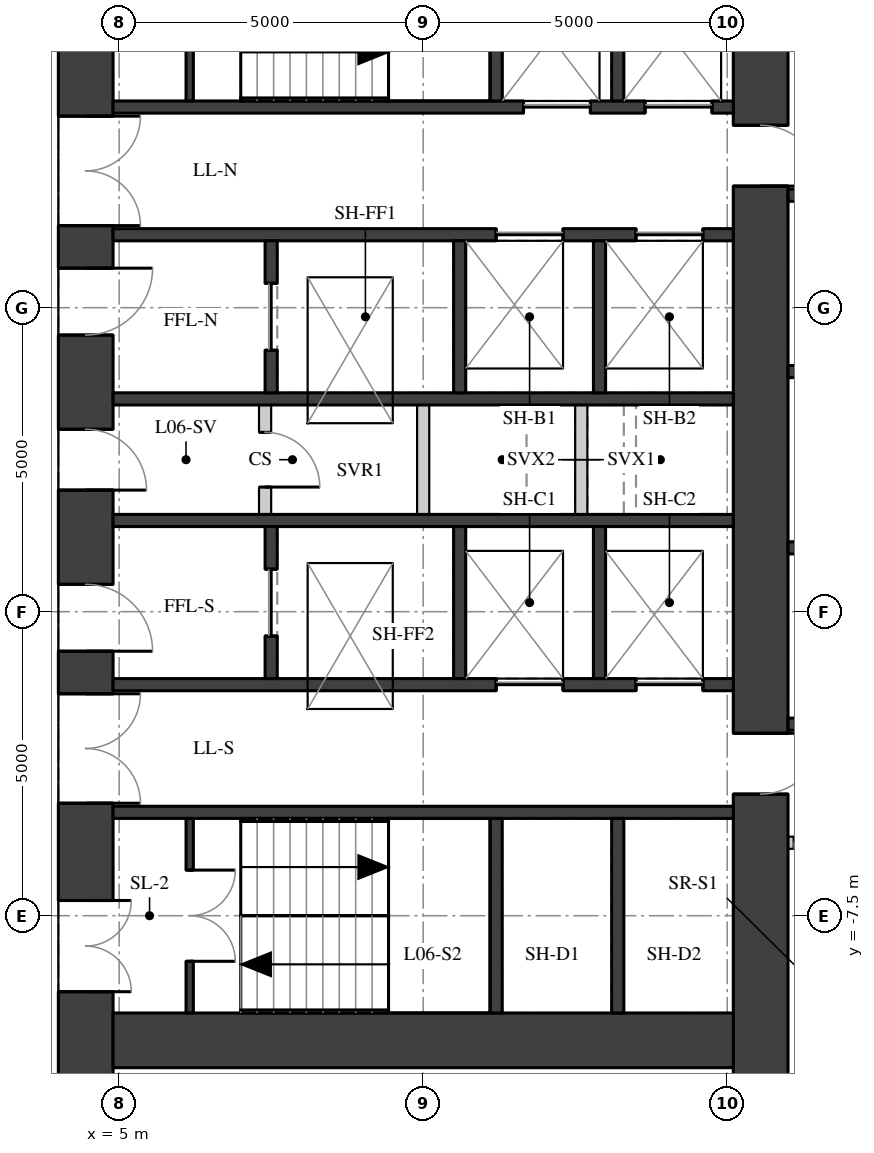
"""IFC4 building model, lengths in metres.
Left out: names, types, materials, properties, quantities, classifications, styles, units other than length and angle.
Written with IfcOpenShell. Run it as: python <this file> out.ifc"""

import sys

from ifc_helpers import new_model, si_unit, direction, frame, frame_2d, origin, place, context, subcontext, project, spatial, rectangle, extrude, element, fill, save


model = new_model("IFC4")
c1 = context("Model", 3, precision=1e-05, world=origin(), true_north=direction((0.0, 1.0)))
c2 = subcontext(c1, "Body", "Model", "MODEL_VIEW")
j1 = project(units=[si_unit("LENGTHUNIT", "METRE"), si_unit("PLANEANGLEUNIT", "RADIAN")], contexts=[c1])
p1 = place(None, origin())
s1 = spatial("IfcSite", under=j1, at=p1, CompositionType="ELEMENT")
p2 = place(p1, origin())
s2 = spatial("IfcBuilding", under=s1, at=p2, CompositionType="ELEMENT")
p3 = place(p2, frame((0.0, 0.0, 28.3)))
s3 = spatial("IfcBuildingStorey", under=s2, at=p3, CompositionType="ELEMENT", Elevation=28.3)
p4 = place(p3, frame((4.45, -11.1, 0.0), z_axis=(0.0, 0.0, 1.0), x_axis=(0.0, 1.0, 0.0)))
e1 = element("IfcWall", 1, at=p4, inside=s3, PredefinedType="SHEAR", context=c2, shape_type="SweptSolid", body=[
    extrude(rectangle(XDim=22.2, YDim=0.9, at=frame_2d((11.1, 0.0))), origin(), (0.0, 0.0, 1.0), 3.02),
])
p5 = place(p4, frame((2.35, 0.0, 0.0)))
e2 = element("IfcOpeningElement", 2, at=p5, cuts=e1, PredefinedType="OPENING", context=c2, shape_type="SweptSolid", body=[
    extrude(rectangle(XDim=1.5, YDim=2.1, at=frame_2d((0.75, 1.05))), frame((0.0, 0.46, 0.0), z_axis=(0.0, -1.0, 0.0), x_axis=(1.0, 0.0, 0.0)), (0.0, 0.0, 1.0), 0.92),
])
p6 = place(p4, frame((5.45, 0.0, 0.0)))
e3 = element("IfcOpeningElement", 3, at=p6, cuts=e1, PredefinedType="OPENING", context=c2, shape_type="SweptSolid", body=[
    extrude(rectangle(XDim=1.8, YDim=2.1, at=frame_2d((0.9, 1.05))), frame((0.0, 0.46, 0.0), z_axis=(0.0, -1.0, 0.0), x_axis=(1.0, 0.0, 0.0)), (0.0, 0.0, 1.0), 0.92),
])
p7 = place(p4, frame((7.95, 0.0, 0.0)))
e4 = element("IfcOpeningElement", 4, at=p7, cuts=e1, PredefinedType="OPENING", context=c2, shape_type="SweptSolid", body=[
    extrude(rectangle(XDim=1.1, YDim=2.1, at=frame_2d((0.55, 1.05))), frame((0.0, 0.46, 0.0), z_axis=(0.0, -1.0, 0.0), x_axis=(1.0, 0.0, 0.0)), (0.0, 0.0, 1.0), 0.92),
])
p8 = place(p4, frame((10.6, 0.0, 0.0)))
e5 = element("IfcOpeningElement", 5, at=p8, cuts=e1, PredefinedType="OPENING", context=c2, shape_type="SweptSolid", body=[
    extrude(rectangle(XDim=1.0, YDim=2.1, at=frame_2d((0.5, 1.05))), frame((0.0, 0.46, 0.0), z_axis=(0.0, -1.0, 0.0), x_axis=(1.0, 0.0, 0.0)), (0.0, 0.0, 1.0), 0.92),
])
p9 = place(p4, frame((13.15, 0.0, 0.0)))
e6 = element("IfcOpeningElement", 6, at=p9, cuts=e1, PredefinedType="OPENING", context=c2, shape_type="SweptSolid", body=[
    extrude(rectangle(XDim=1.1, YDim=2.1, at=frame_2d((0.55, 1.05))), frame((0.0, 0.46, 0.0), z_axis=(0.0, -1.0, 0.0), x_axis=(1.0, 0.0, 0.0)), (0.0, 0.0, 1.0), 0.92),
])
p10 = place(p4, frame((14.95, 0.0, 0.0)))
e7 = element("IfcOpeningElement", 7, at=p10, cuts=e1, PredefinedType="OPENING", context=c2, shape_type="SweptSolid", body=[
    extrude(rectangle(XDim=1.8, YDim=2.1, at=frame_2d((0.9, 1.05))), frame((0.0, 0.46, 0.0), z_axis=(0.0, -1.0, 0.0), x_axis=(1.0, 0.0, 0.0)), (0.0, 0.0, 1.0), 0.92),
])
p11 = place(p4, frame((18.35, 0.0, 0.0)))
e8 = element("IfcOpeningElement", 8, at=p11, cuts=e1, PredefinedType="OPENING", context=c2, shape_type="SweptSolid", body=[
    extrude(rectangle(XDim=1.5, YDim=2.1, at=frame_2d((0.75, 1.05))), frame((0.0, 0.46, 0.0), z_axis=(0.0, -1.0, 0.0), x_axis=(1.0, 0.0, 0.0)), (0.0, 0.0, 1.0), 0.92),
])
p12 = place(p3, frame((15.55, -11.1, 0.0), z_axis=(0.0, 0.0, 1.0), x_axis=(0.0, 1.0, 0.0)))
e9 = element("IfcWall", 9, at=p12, inside=s3, PredefinedType="SHEAR", context=c2, shape_type="SweptSolid", body=[
    extrude(rectangle(XDim=22.2, YDim=0.9, at=frame_2d((11.1, 0.0))), origin(), (0.0, 0.0, 1.0), 3.02),
])
p13 = place(p12, frame((15.6, 0.0, 0.0)))
e10 = element("IfcOpeningElement", 10, at=p13, cuts=e9, PredefinedType="OPENING", context=c2, shape_type="SweptSolid", body=[
    extrude(rectangle(XDim=1.0, YDim=2.1, at=frame_2d((0.5, 1.05))), frame((0.0, 0.46, 0.0), z_axis=(0.0, -1.0, 0.0), x_axis=(1.0, 0.0, 0.0)), (0.0, 0.0, 1.0), 0.92),
])
p14 = place(p12, frame((5.6, 0.0, 0.0)))
e11 = element("IfcOpeningElement", 11, at=p14, cuts=e9, PredefinedType="OPENING", context=c2, shape_type="SweptSolid", body=[
    extrude(rectangle(XDim=1.0, YDim=2.1, at=frame_2d((0.5, 1.05))), frame((0.0, 0.46, 0.0), z_axis=(0.0, -1.0, 0.0), x_axis=(1.0, 0.0, 0.0)), (0.0, 0.0, 1.0), 0.92),
])
p15 = place(p3, frame((4.9, -9.55, 0.0), z_axis=(0.0, 0.0, 1.0), x_axis=(1.0, 0.0, 0.0)))
e12 = element("IfcWall", 12, at=p15, inside=s3, PredefinedType="SHEAR", context=c2, shape_type="SweptSolid", body=[
    extrude(rectangle(XDim=10.2, YDim=0.9, at=frame_2d((5.1, 0.0))), origin(), (0.0, 0.0, 1.0), 3.02),
])
p16 = place(p3, frame((4.9, 5.8, 0.0), z_axis=(0.0, 0.0, 1.0), x_axis=(1.0, 0.0, 0.0)))
e13 = element("IfcWall", 13, at=p16, inside=s3, PredefinedType="SHEAR", context=c2, shape_type="SweptSolid", body=[
    extrude(rectangle(XDim=10.2, YDim=0.2, at=frame_2d((5.1, 0.0))), origin(), (0.0, 0.0, 1.0), 3.02),
])
p17 = place(p16, frame((6.75, 0.0, 0.0)))
e14 = element("IfcOpeningElement", 14, at=p17, cuts=e13, PredefinedType="OPENING", context=c2, shape_type="SweptSolid", body=[
    extrude(rectangle(XDim=1.1, YDim=2.1, at=frame_2d((0.55, 1.05))), frame((0.0, 0.11, 0.0), z_axis=(0.0, -1.0, 0.0), x_axis=(1.0, 0.0, 0.0)), (0.0, 0.0, 1.0), 0.22),
])
p18 = place(p16, frame((8.75, 0.0, 0.0)))
e15 = element("IfcOpeningElement", 15, at=p18, cuts=e13, PredefinedType="OPENING", context=c2, shape_type="SweptSolid", body=[
    extrude(rectangle(XDim=1.1, YDim=2.1, at=frame_2d((0.55, 1.05))), frame((0.0, 0.11, 0.0), z_axis=(0.0, -1.0, 0.0), x_axis=(1.0, 0.0, 0.0)), (0.0, 0.0, 1.0), 0.22),
])
p19 = place(p3, frame((4.9, 3.7, 0.0), z_axis=(0.0, 0.0, 1.0), x_axis=(1.0, 0.0, 0.0)))
e16 = element("IfcWall", 16, at=p19, inside=s3, PredefinedType="SHEAR", context=c2, shape_type="SweptSolid", body=[
    extrude(rectangle(XDim=10.2, YDim=0.2, at=frame_2d((5.1, 0.0))), origin(), (0.0, 0.0, 1.0), 3.02),
])
p20 = place(p19, frame((6.3, 0.0, 0.0)))
e17 = element("IfcOpeningElement", 17, at=p20, cuts=e16, PredefinedType="OPENING", context=c2, shape_type="SweptSolid", body=[
    extrude(rectangle(XDim=1.1, YDim=2.1, at=frame_2d((0.55, 1.05))), frame((0.0, 0.11, 0.0), z_axis=(0.0, -1.0, 0.0), x_axis=(1.0, 0.0, 0.0)), (0.0, 0.0, 1.0), 0.22),
])
p21 = place(p19, frame((8.6, 0.0, 0.0)))
e18 = element("IfcOpeningElement", 18, at=p21, cuts=e16, PredefinedType="OPENING", context=c2, shape_type="SweptSolid", body=[
    extrude(rectangle(XDim=1.1, YDim=2.1, at=frame_2d((0.55, 1.05))), frame((0.0, 0.11, 0.0), z_axis=(0.0, -1.0, 0.0), x_axis=(1.0, 0.0, 0.0)), (0.0, 0.0, 1.0), 0.22),
])
for number, where, z_axis, x_axis in (
    (19, (4.9, 1.0, 0.0), (0.0, 0.0, 1.0), (1.0, 0.0, 0.0)),
    (20, (4.9, -1.0, 0.0), (0.0, 0.0, 1.0), (1.0, 0.0, 0.0)),
):
    element("IfcWall", number, at=place(p3, frame(where, z_axis=z_axis, x_axis=x_axis)), inside=s3, PredefinedType="SHEAR", context=c2, shape_type="SweptSolid", body=[
        extrude(rectangle(XDim=10.2, YDim=0.2, at=frame_2d((5.1, 0.0))), origin(), (0.0, 0.0, 1.0), 3.02),
    ])
p22 = place(p3, frame((4.9, -3.7, 0.0), z_axis=(0.0, 0.0, 1.0), x_axis=(1.0, 0.0, 0.0)))
e21 = element("IfcWall", 21, at=p22, inside=s3, PredefinedType="SHEAR", context=c2, shape_type="SweptSolid", body=[
    extrude(rectangle(XDim=10.2, YDim=0.2, at=frame_2d((5.1, 0.0))), origin(), (0.0, 0.0, 1.0), 3.02),
])
p23 = place(p22, frame((6.3, 0.0, 0.0)))
e22 = element("IfcOpeningElement", 22, at=p23, cuts=e21, PredefinedType="OPENING", context=c2, shape_type="SweptSolid", body=[
    extrude(rectangle(XDim=1.1, YDim=2.1, at=frame_2d((0.55, 1.05))), frame((0.0, 0.11, 0.0), z_axis=(0.0, -1.0, 0.0), x_axis=(1.0, 0.0, 0.0)), (0.0, 0.0, 1.0), 0.22),
])
p24 = place(p22, frame((8.6, 0.0, 0.0)))
e23 = element("IfcOpeningElement", 23, at=p24, cuts=e21, PredefinedType="OPENING", context=c2, shape_type="SweptSolid", body=[
    extrude(rectangle(XDim=1.1, YDim=2.1, at=frame_2d((0.55, 1.05))), frame((0.0, 0.11, 0.0), z_axis=(0.0, -1.0, 0.0), x_axis=(1.0, 0.0, 0.0)), (0.0, 0.0, 1.0), 0.22),
])
p25 = place(p3, frame((4.9, -5.8, 0.0), z_axis=(0.0, 0.0, 1.0), x_axis=(1.0, 0.0, 0.0)))
e24 = element("IfcWall", 24, at=p25, inside=s3, PredefinedType="SHEAR", context=c2, shape_type="SweptSolid", body=[
    extrude(rectangle(XDim=10.2, YDim=0.2, at=frame_2d((5.1, 0.0))), origin(), (0.0, 0.0, 1.0), 3.02),
])
for number, where, z_axis, x_axis in (
    (25, (11.2, 5.9, 0.0), (0.0, 0.0, 1.0), (0.0, 1.0, 0.0)),
    (26, (11.2, -9.1, 0.0), (0.0, 0.0, 1.0), (0.0, 1.0, 0.0)),
    (27, (13.2, 5.9, 0.0), (0.0, 0.0, 1.0), (0.0, 1.0, 0.0)),
    (28, (13.2, -9.1, 0.0), (0.0, 0.0, 1.0), (0.0, 1.0, 0.0)),
):
    element("IfcWall", number, at=place(p3, frame(where, z_axis=z_axis, x_axis=x_axis)), inside=s3, PredefinedType="SHEAR", context=c2, shape_type="SweptSolid", body=[
        extrude(rectangle(XDim=3.2, YDim=0.2, at=frame_2d((1.6, 0.0))), origin(), (0.0, 0.0, 1.0), 3.02),
    ])
p26 = place(p3, frame((7.5, 1.1, 0.0), z_axis=(0.0, 0.0, 1.0), x_axis=(0.0, 1.0, 0.0)))
e29 = element("IfcWall", 29, at=p26, inside=s3, PredefinedType="SHEAR", context=c2, shape_type="SweptSolid", body=[
    extrude(rectangle(XDim=2.5, YDim=0.2, at=frame_2d((1.25, 0.0))), origin(), (0.0, 0.0, 1.0), 3.02),
])
p27 = place(p26, frame((0.7, 0.0, 0.0)))
e30 = element("IfcOpeningElement", 30, at=p27, cuts=e29, PredefinedType="OPENING", context=c2, shape_type="SweptSolid", body=[
    extrude(rectangle(XDim=1.1, YDim=2.1, at=frame_2d((0.55, 1.05))), frame((0.0, 0.11, 0.0), z_axis=(0.0, -1.0, 0.0), x_axis=(1.0, 0.0, 0.0)), (0.0, 0.0, 1.0), 0.22),
])
p28 = place(p3, frame((7.5, -3.6, 0.0), z_axis=(0.0, 0.0, 1.0), x_axis=(0.0, 1.0, 0.0)))
e31 = element("IfcWall", 31, at=p28, inside=s3, PredefinedType="SHEAR", context=c2, shape_type="SweptSolid", body=[
    extrude(rectangle(XDim=2.5, YDim=0.2, at=frame_2d((1.25, 0.0))), origin(), (0.0, 0.0, 1.0), 3.02),
])
p29 = place(p28, frame((0.7, 0.0, 0.0)))
e32 = element("IfcOpeningElement", 32, at=p29, cuts=e31, PredefinedType="OPENING", context=c2, shape_type="SweptSolid", body=[
    extrude(rectangle(XDim=1.1, YDim=2.1, at=frame_2d((0.55, 1.05))), frame((0.0, 0.11, 0.0), z_axis=(0.0, -1.0, 0.0), x_axis=(1.0, 0.0, 0.0)), (0.0, 0.0, 1.0), 0.22),
])
for number, where, z_axis, x_axis in (
    (33, (10.6, 1.1, 0.0), (0.0, 0.0, 1.0), (0.0, 1.0, 0.0)),
    (34, (10.6, -3.6, 0.0), (0.0, 0.0, 1.0), (0.0, 1.0, 0.0)),
    (35, (12.9, 1.1, 0.0), (0.0, 0.0, 1.0), (0.0, 1.0, 0.0)),
    (36, (12.9, -3.6, 0.0), (0.0, 0.0, 1.0), (0.0, 1.0, 0.0)),
):
    element("IfcWall", number, at=place(p3, frame(where, z_axis=z_axis, x_axis=x_axis)), inside=s3, PredefinedType="SHEAR", context=c2, shape_type="SweptSolid", body=[
        extrude(rectangle(XDim=2.5, YDim=0.2, at=frame_2d((1.25, 0.0))), origin(), (0.0, 0.0, 1.0), 3.02),
    ])
p30 = place(p3, frame((6.16, 5.9, 0.0), z_axis=(0.0, 0.0, 1.0), x_axis=(0.0, 1.0, 0.0)))
e37 = element("IfcWall", 37, at=p30, inside=s3, PredefinedType="SHEAR", context=c2, shape_type="SweptSolid", body=[
    extrude(rectangle(XDim=3.2, YDim=0.12, at=frame_2d((1.6, 0.0))), origin(), (0.0, 0.0, 1.0), 3.02),
])
p31 = place(p30, frame((0.85, 0.0, 0.0)))
e38 = element("IfcOpeningElement", 38, at=p31, cuts=e37, PredefinedType="OPENING", context=c2, shape_type="SweptSolid", body=[
    extrude(rectangle(XDim=1.5, YDim=2.1, at=frame_2d((0.75, 1.05))), frame((0.0, 0.07, 0.0), z_axis=(0.0, -1.0, 0.0), x_axis=(1.0, 0.0, 0.0)), (0.0, 0.0, 1.0), 0.14),
])
p32 = place(p3, frame((6.16, -9.1, 0.0), z_axis=(0.0, 0.0, 1.0), x_axis=(0.0, 1.0, 0.0)))
e39 = element("IfcWall", 39, at=p32, inside=s3, PredefinedType="SHEAR", context=c2, shape_type="SweptSolid", body=[
    extrude(rectangle(XDim=3.2, YDim=0.12, at=frame_2d((1.6, 0.0))), origin(), (0.0, 0.0, 1.0), 3.02),
])
p33 = place(p32, frame((0.85, 0.0, 0.0)))
e40 = element("IfcOpeningElement", 40, at=p33, cuts=e39, PredefinedType="OPENING", context=c2, shape_type="SweptSolid", body=[
    extrude(rectangle(XDim=1.5, YDim=2.1, at=frame_2d((0.75, 1.05))), frame((0.0, 0.07, 0.0), z_axis=(0.0, -1.0, 0.0), x_axis=(1.0, 0.0, 0.0)), (0.0, 0.0, 1.0), 0.14),
])
p34 = place(p3, frame((7.4, -0.9, 0.0), z_axis=(0.0, 0.0, 1.0), x_axis=(0.0, 1.0, 0.0)))
e41 = element("IfcWall", 41, at=p34, inside=s3, PredefinedType="PARTITIONING", context=c2, shape_type="SweptSolid", body=[
    extrude(rectangle(XDim=1.8, YDim=0.2, at=frame_2d((0.9, 0.0))), origin(), (0.0, 0.0, 1.0), 3.02),
])
p35 = place(p34, frame((0.45, 0.0, 0.0)))
e42 = element("IfcOpeningElement", 42, at=p35, cuts=e41, PredefinedType="OPENING", context=c2, shape_type="SweptSolid", body=[
    extrude(rectangle(XDim=0.9, YDim=2.1, at=frame_2d((0.45, 1.05))), frame((0.0, 0.11, 0.0), z_axis=(0.0, -1.0, 0.0), x_axis=(1.0, 0.0, 0.0)), (0.0, 0.0, 1.0), 0.22),
])
for number, where, z_axis, x_axis in (
    (43, (10.0, -0.9, 0.0), (0.0, 0.0, 1.0), (0.0, 1.0, 0.0)),
    (44, (12.6, -0.9, 0.0), (0.0, 0.0, 1.0), (0.0, 1.0, 0.0)),
):
    element("IfcWall", number, at=place(p3, frame(where, z_axis=z_axis, x_axis=x_axis)), inside=s3, PredefinedType="PARTITIONING", context=c2, shape_type="SweptSolid", body=[
        extrude(rectangle(XDim=1.8, YDim=0.2, at=frame_2d((0.9, 0.0))), origin(), (0.0, 0.0, 1.0), 3.02),
    ])
for number, where, z_axis, x_axis in (
    (45, (16.0, -4.35, 0.0), (0.0, 0.0, 1.0), (1.0, 0.0, 0.0)),
    (46, (16.0, -1.45, 0.0), (0.0, 0.0, 1.0), (1.0, 0.0, 0.0)),
    (47, (16.0, 1.45, 0.0), (0.0, 0.0, 1.0), (1.0, 0.0, 0.0)),
    (48, (16.0, 4.35, 0.0), (0.0, 0.0, 1.0), (1.0, 0.0, 0.0)),
):
    element("IfcWall", number, at=place(p3, frame(where, z_axis=z_axis, x_axis=x_axis)), inside=s3, PredefinedType="SHEAR", context=c2, shape_type="SweptSolid", body=[
        extrude(rectangle(XDim=2.3, YDim=0.2, at=frame_2d((1.15, 0.0))), origin(), (0.0, 0.0, 1.0), 3.02),
    ])
p36 = place(p3, frame((16.0, -6.3, 0.0), z_axis=(0.0, 0.0, 1.0), x_axis=(1.0, 0.0, 0.0)))
e49 = element("IfcWall", 49, at=p36, inside=s3, PredefinedType="PARTITIONING", context=c2, shape_type="SweptSolid", body=[
    extrude(rectangle(XDim=2.3, YDim=0.2, at=frame_2d((1.15, 0.0))), origin(), (0.0, 0.0, 1.0), 3.02),
])
p37 = place(p36, frame((0.1, 0.0, 0.0)))
e50 = element("IfcOpeningElement", 50, at=p37, cuts=e49, PredefinedType="OPENING", context=c2, shape_type="SweptSolid", body=[
    extrude(rectangle(XDim=0.9, YDim=2.1, at=frame_2d((0.45, 1.05))), frame((0.0, 0.11, 0.0), z_axis=(0.0, -1.0, 0.0), x_axis=(1.0, 0.0, 0.0)), (0.0, 0.0, 1.0), 0.22),
])
p38 = place(p5, origin())
e51 = element("IfcDoor", 51, at=p38, inside=s3, OperationType="DOUBLE_DOOR_SINGLE_SWING", PredefinedType="DOOR", context=c2, shape_type="SweptSolid", body=[
    extrude(rectangle(XDim=1.5, YDim=2.1, at=frame_2d((0.75, 1.05))), frame((0.0, 0.025, 0.0), z_axis=(0.0, -1.0, 0.0), x_axis=(1.0, 0.0, 0.0)), (0.0, 0.0, 1.0), 0.05),
])
fill(e2, e51)
p39 = place(p6, origin())
e52 = element("IfcDoor", 52, at=p39, inside=s3, OperationType="DOUBLE_DOOR_SINGLE_SWING", PredefinedType="DOOR", context=c2, shape_type="SweptSolid", body=[
    extrude(rectangle(XDim=1.8, YDim=2.1, at=frame_2d((0.9, 1.05))), frame((0.0, 0.025, 0.0), z_axis=(0.0, -1.0, 0.0), x_axis=(1.0, 0.0, 0.0)), (0.0, 0.0, 1.0), 0.05),
])
fill(e3, e52)
p40 = place(p7, origin())
e53 = element("IfcDoor", 53, at=p40, inside=s3, OperationType="SINGLE_SWING_RIGHT", PredefinedType="DOOR", context=c2, shape_type="SweptSolid", body=[
    extrude(rectangle(XDim=1.1, YDim=2.1, at=frame_2d((0.55, 1.05))), frame((0.0, 0.025, 0.0), z_axis=(0.0, -1.0, 0.0), x_axis=(1.0, 0.0, 0.0)), (0.0, 0.0, 1.0), 0.05),
])
fill(e4, e53)
p41 = place(p8, origin())
e54 = element("IfcDoor", 54, at=p41, inside=s3, OperationType="SINGLE_SWING_RIGHT", PredefinedType="DOOR", context=c2, shape_type="SweptSolid", body=[
    extrude(rectangle(XDim=1.0, YDim=2.1, at=frame_2d((0.5, 1.05))), frame((0.0, 0.025, 0.0), z_axis=(0.0, -1.0, 0.0), x_axis=(1.0, 0.0, 0.0)), (0.0, 0.0, 1.0), 0.05),
])
fill(e5, e54)
p42 = place(p9, origin())
e55 = element("IfcDoor", 55, at=p42, inside=s3, OperationType="SINGLE_SWING_LEFT", PredefinedType="DOOR", context=c2, shape_type="SweptSolid", body=[
    extrude(rectangle(XDim=1.1, YDim=2.1, at=frame_2d((0.55, 1.05))), frame((0.0, 0.025, 0.0), z_axis=(0.0, -1.0, 0.0), x_axis=(1.0, 0.0, 0.0)), (0.0, 0.0, 1.0), 0.05),
])
fill(e6, e55)
p43 = place(p10, origin())
e56 = element("IfcDoor", 56, at=p43, inside=s3, OperationType="DOUBLE_DOOR_SINGLE_SWING", PredefinedType="DOOR", context=c2, shape_type="SweptSolid", body=[
    extrude(rectangle(XDim=1.8, YDim=2.1, at=frame_2d((0.9, 1.05))), frame((0.0, 0.025, 0.0), z_axis=(0.0, -1.0, 0.0), x_axis=(1.0, 0.0, 0.0)), (0.0, 0.0, 1.0), 0.05),
])
fill(e7, e56)
p44 = place(p33, origin())
e57 = element("IfcDoor", 57, at=p44, inside=s3, OperationType="DOUBLE_DOOR_SINGLE_SWING", PredefinedType="DOOR", context=c2, shape_type="SweptSolid", body=[
    extrude(rectangle(XDim=1.5, YDim=2.1, at=frame_2d((0.75, 1.05))), frame((0.0, 0.025, 0.0), z_axis=(0.0, -1.0, 0.0), x_axis=(1.0, 0.0, 0.0)), (0.0, 0.0, 1.0), 0.05),
])
fill(e40, e57)
p45 = place(p17, origin())
e58 = element("IfcDoor", 58, at=p45, inside=s3, OperationType="DOUBLE_DOOR_SLIDING", PredefinedType="DOOR", context=c2, shape_type="SweptSolid", body=[
    extrude(rectangle(XDim=1.1, YDim=2.1, at=frame_2d((0.55, 1.05))), frame((0.0, 0.025, 0.0), z_axis=(0.0, -1.0, 0.0), x_axis=(1.0, 0.0, 0.0)), (0.0, 0.0, 1.0), 0.05),
])
fill(e14, e58)
p46 = place(p18, origin())
e59 = element("IfcDoor", 59, at=p46, inside=s3, OperationType="DOUBLE_DOOR_SLIDING", PredefinedType="DOOR", context=c2, shape_type="SweptSolid", body=[
    extrude(rectangle(XDim=1.1, YDim=2.1, at=frame_2d((0.55, 1.05))), frame((0.0, 0.025, 0.0), z_axis=(0.0, -1.0, 0.0), x_axis=(1.0, 0.0, 0.0)), (0.0, 0.0, 1.0), 0.05),
])
fill(e15, e59)
p47 = place(p20, origin())
e60 = element("IfcDoor", 60, at=p47, inside=s3, OperationType="DOUBLE_DOOR_SLIDING", PredefinedType="DOOR", context=c2, shape_type="SweptSolid", body=[
    extrude(rectangle(XDim=1.1, YDim=2.1, at=frame_2d((0.55, 1.05))), frame((0.0, 0.025, 0.0), z_axis=(0.0, -1.0, 0.0), x_axis=(1.0, 0.0, 0.0)), (0.0, 0.0, 1.0), 0.05),
])
fill(e17, e60)
p48 = place(p21, origin())
e61 = element("IfcDoor", 61, at=p48, inside=s3, OperationType="DOUBLE_DOOR_SLIDING", PredefinedType="DOOR", context=c2, shape_type="SweptSolid", body=[
    extrude(rectangle(XDim=1.1, YDim=2.1, at=frame_2d((0.55, 1.05))), frame((0.0, 0.025, 0.0), z_axis=(0.0, -1.0, 0.0), x_axis=(1.0, 0.0, 0.0)), (0.0, 0.0, 1.0), 0.05),
])
fill(e18, e61)
p49 = place(p23, origin())
e62 = element("IfcDoor", 62, at=p49, inside=s3, OperationType="DOUBLE_DOOR_SLIDING", PredefinedType="DOOR", context=c2, shape_type="SweptSolid", body=[
    extrude(rectangle(XDim=1.1, YDim=2.1, at=frame_2d((0.55, 1.05))), frame((0.0, 0.025, 0.0), z_axis=(0.0, -1.0, 0.0), x_axis=(1.0, 0.0, 0.0)), (0.0, 0.0, 1.0), 0.05),
])
fill(e22, e62)
p50 = place(p24, origin())
e63 = element("IfcDoor", 63, at=p50, inside=s3, OperationType="DOUBLE_DOOR_SLIDING", PredefinedType="DOOR", context=c2, shape_type="SweptSolid", body=[
    extrude(rectangle(XDim=1.1, YDim=2.1, at=frame_2d((0.55, 1.05))), frame((0.0, 0.025, 0.0), z_axis=(0.0, -1.0, 0.0), x_axis=(1.0, 0.0, 0.0)), (0.0, 0.0, 1.0), 0.05),
])
fill(e23, e63)
p51 = place(p27, origin())
e64 = element("IfcDoor", 64, at=p51, inside=s3, OperationType="DOUBLE_DOOR_SLIDING", PredefinedType="DOOR", context=c2, shape_type="SweptSolid", body=[
    extrude(rectangle(XDim=1.1, YDim=2.1, at=frame_2d((0.55, 1.05))), frame((0.0, 0.025, 0.0), z_axis=(0.0, -1.0, 0.0), x_axis=(1.0, 0.0, 0.0)), (0.0, 0.0, 1.0), 0.05),
])
fill(e30, e64)
p52 = place(p29, origin())
e65 = element("IfcDoor", 65, at=p52, inside=s3, OperationType="DOUBLE_DOOR_SLIDING", PredefinedType="DOOR", context=c2, shape_type="SweptSolid", body=[
    extrude(rectangle(XDim=1.1, YDim=2.1, at=frame_2d((0.55, 1.05))), frame((0.0, 0.025, 0.0), z_axis=(0.0, -1.0, 0.0), x_axis=(1.0, 0.0, 0.0)), (0.0, 0.0, 1.0), 0.05),
])
fill(e32, e65)
p53 = place(p35, origin())
e66 = element("IfcDoor", 66, at=p53, inside=s3, OperationType="SINGLE_SWING_RIGHT", PredefinedType="DOOR", context=c2, shape_type="SweptSolid", body=[
    extrude(rectangle(XDim=0.9, YDim=2.1, at=frame_2d((0.45, 1.05))), frame((0.0, 0.025, 0.0), z_axis=(0.0, -1.0, 0.0), x_axis=(1.0, 0.0, 0.0)), (0.0, 0.0, 1.0), 0.05),
])
fill(e42, e66)
p54 = place(p13, origin())
e67 = element("IfcDoor", 67, at=p54, inside=s3, OperationType="SINGLE_SWING_RIGHT", PredefinedType="DOOR", context=c2, shape_type="SweptSolid", body=[
    extrude(rectangle(XDim=1.0, YDim=2.1, at=frame_2d((0.5, 1.05))), frame((0.0, 0.025, 0.0), z_axis=(0.0, -1.0, 0.0), x_axis=(1.0, 0.0, 0.0)), (0.0, 0.0, 1.0), 0.05),
])
fill(e10, e67)
p55 = place(p14, origin())
e68 = element("IfcDoor", 68, at=p55, inside=s3, OperationType="SINGLE_SWING_LEFT", PredefinedType="DOOR", context=c2, shape_type="SweptSolid", body=[
    extrude(rectangle(XDim=1.0, YDim=2.1, at=frame_2d((0.5, 1.05))), frame((0.0, 0.025, 0.0), z_axis=(0.0, -1.0, 0.0), x_axis=(1.0, 0.0, 0.0)), (0.0, 0.0, 1.0), 0.05),
])
fill(e11, e68)
save(model, sys.argv[1])
